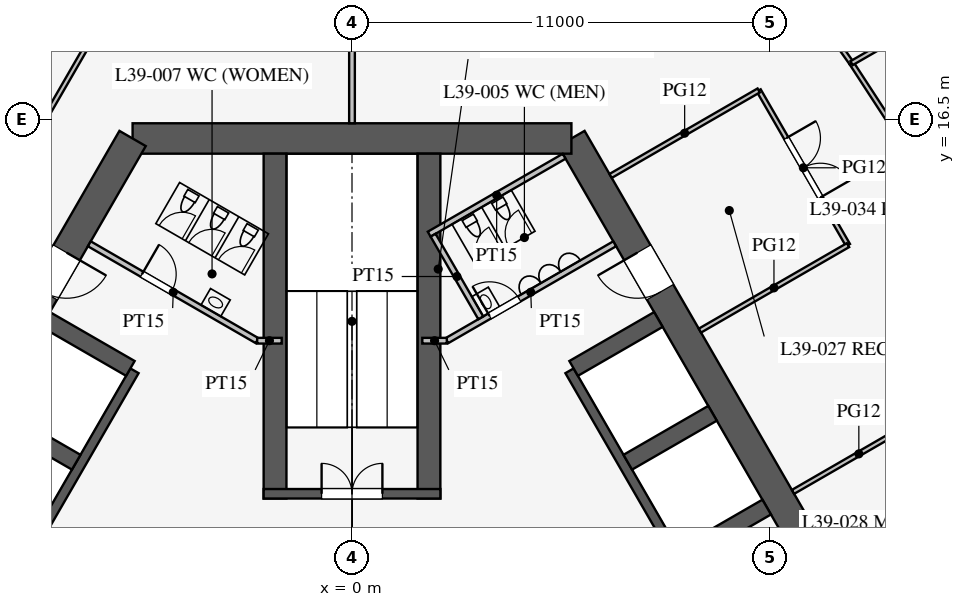
"""IFC4 building model, lengths in metres.
Left out: names, types, materials, properties, quantities, classifications, styles, units other than length and angle.
Written with IfcOpenShell. Run it as: python <this file> out.ifc"""

import sys

from ifc_helpers import new_model, si_unit, direction, frame, frame_2d, origin, place, context, subcontext, project, spatial, rectangle, extrude, element, fill, save


model = new_model("IFC4")
c1 = context("Model", 3, precision=1e-05, world=origin(), true_north=direction((0.0, 1.0)))
c2 = subcontext(c1, "Body", "Model", "MODEL_VIEW")
j1 = project(units=[si_unit("LENGTHUNIT", "METRE"), si_unit("PLANEANGLEUNIT", "RADIAN")], contexts=[c1])
p1 = place(None, origin())
s1 = spatial("IfcSite", under=j1, at=p1, CompositionType="ELEMENT")
p2 = place(p1, origin())
s2 = spatial("IfcBuilding", under=s1, at=p2, CompositionType="ELEMENT")
p3 = place(p2, frame((0.0, 0.0, 170.3)))
s3 = spatial("IfcBuildingStorey", under=s2, at=p3, CompositionType="ELEMENT", Elevation=170.3)
p4 = place(p3, frame((16.743, -3.0, 0.0), z_axis=(0.0, 0.0, 1.0), x_axis=(-0.500002442456, 0.866023993627, 0.0)))
e1 = element("IfcWall", 1, at=p4, inside=s3, PredefinedType="SHEAR", context=c2, shape_type="SweptSolid", body=[
    extrude(rectangle(XDim=21.939, YDim=0.8, at=frame_2d((10.97, 0.0))), origin(), (0.0, 0.0, 1.0), 4.2),
])
p5 = place(p4, frame((17.27, 0.0, 0.0)))
e2 = element("IfcOpeningElement", 2, at=p5, cuts=e1, PredefinedType="OPENING", context=c2, shape_type="SweptSolid", body=[
    extrude(rectangle(XDim=1.2, YDim=2.1, at=frame_2d((0.6, 1.05))), frame((0.0, 0.41, 0.0), z_axis=(0.0, -1.0, 0.0), x_axis=(1.0, 0.0, 0.0)), (0.0, 0.0, 1.0), 0.82),
])
p6 = place(p4, frame((3.47, 0.0, 0.0)))
e3 = element("IfcOpeningElement", 3, at=p6, cuts=e1, PredefinedType="OPENING", context=c2, shape_type="SweptSolid", body=[
    extrude(rectangle(XDim=1.2, YDim=2.1, at=frame_2d((0.6, 1.05))), frame((0.0, 0.41, 0.0), z_axis=(0.0, -1.0, 0.0), x_axis=(1.0, 0.0, 0.0)), (0.0, 0.0, 1.0), 0.82),
])
p7 = place(p3, frame((5.773, 16.0, 0.0), z_axis=(0.0, 0.0, 1.0), x_axis=(-1.0, 0.0, 0.0)))
e4 = element("IfcWall", 4, at=p7, inside=s3, PredefinedType="SHEAR", context=c2, shape_type="SweptSolid", body=[
    extrude(rectangle(XDim=11.547, YDim=0.8, at=frame_2d((5.773, 0.0))), origin(), (0.0, 0.0, 1.0), 4.2),
])
p8 = place(p3, frame((-5.773, 16.0, 0.0), z_axis=(0.0, 0.0, 1.0), x_axis=(-0.500002442456, -0.866023993627, 0.0)))
e5 = element("IfcWall", 5, at=p8, inside=s3, PredefinedType="SHEAR", context=c2, shape_type="SweptSolid", body=[
    extrude(rectangle(XDim=21.939, YDim=0.8, at=frame_2d((10.97, 0.0))), origin(), (0.0, 0.0, 1.0), 4.2),
])
p9 = place(p8, frame((17.27, 0.0, 0.0)))
e6 = element("IfcOpeningElement", 6, at=p9, cuts=e5, PredefinedType="OPENING", context=c2, shape_type="SweptSolid", body=[
    extrude(rectangle(XDim=1.2, YDim=2.1, at=frame_2d((0.6, 1.05))), frame((0.0, 0.41, 0.0), z_axis=(0.0, -1.0, 0.0), x_axis=(1.0, 0.0, 0.0)), (0.0, 0.0, 1.0), 0.82),
])
p10 = place(p8, frame((3.47, 0.0, 0.0)))
e7 = element("IfcOpeningElement", 7, at=p10, cuts=e5, PredefinedType="OPENING", context=c2, shape_type="SweptSolid", body=[
    extrude(rectangle(XDim=1.2, YDim=2.1, at=frame_2d((0.6, 1.05))), frame((0.0, 0.41, 0.0), z_axis=(0.0, -1.0, 0.0), x_axis=(1.0, 0.0, 0.0)), (0.0, 0.0, 1.0), 0.82),
])
p11 = place(p3, frame((11.424, 0.014, 0.0), z_axis=(0.0, 0.0, 1.0), x_axis=(-0.500001763848, 0.866024385424, 0.0)))
e8 = element("IfcWall", 8, at=p11, inside=s3, PredefinedType="SHEAR", context=c2, shape_type="SweptSolid", body=[
    extrude(rectangle(XDim=11.4, YDim=0.25, at=frame_2d((5.7, 0.0))), origin(), (0.0, 0.0, 1.0), 4.2),
])
p12 = place(p11, frame((0.975, 0.0, 0.0)))
e9 = element("IfcOpeningElement", 9, at=p12, cuts=e8, PredefinedType="OPENING", context=c2, shape_type="SweptSolid", body=[
    extrude(rectangle(XDim=0.9, YDim=2.1, at=frame_2d((0.45, 1.05))), frame((0.0, 0.135, 0.0), z_axis=(0.0, -1.0, 0.0), x_axis=(1.0, 0.0, 0.0)), (0.0, 0.0, 1.0), 0.27),
])
p13 = place(p11, frame((3.825, 0.0, 0.0)))
e10 = element("IfcOpeningElement", 10, at=p13, cuts=e8, PredefinedType="OPENING", context=c2, shape_type="SweptSolid", body=[
    extrude(rectangle(XDim=0.9, YDim=2.1, at=frame_2d((0.45, 1.05))), frame((0.0, 0.135, 0.0), z_axis=(0.0, -1.0, 0.0), x_axis=(1.0, 0.0, 0.0)), (0.0, 0.0, 1.0), 0.27),
])
for number, where, z_axis, x_axis in (
    (11, (8.682, 5.012, 0.0), (0.0, 0.0, 1.0), (0.866, 0.5, 0.0)),
    (12, (7.257, 7.481, 0.0), (0.0, 0.0, 1.0), (0.866, 0.5, 0.0)),
):
    element("IfcWall", number, at=place(p3, frame(where, z_axis=z_axis, x_axis=x_axis)), inside=s3, PredefinedType="SHEAR", context=c2, shape_type="SweptSolid", body=[
        extrude(rectangle(XDim=2.575, YDim=0.45, at=frame_2d((1.288, 0.0))), origin(), (0.0, 0.0, 1.0), 4.2),
    ])
p14 = place(p3, frame((5.832, 9.949, 0.0), z_axis=(0.0, 0.0, 1.0), x_axis=(0.866029291668, 0.499993265928, 0.0)))
e13 = element("IfcWall", 13, at=p14, inside=s3, PredefinedType="SHEAR", context=c2, shape_type="SweptSolid", body=[
    extrude(rectangle(XDim=2.575, YDim=0.45, at=frame_2d((1.288, 0.0))), origin(), (0.0, 0.0, 1.0), 4.2),
])
p15 = place(p3, frame((-5.724, 9.886, 0.0), z_axis=(0.0, 0.0, 1.0), x_axis=(-0.500001763848, -0.866024385424, 0.0)))
e14 = element("IfcWall", 14, at=p15, inside=s3, PredefinedType="SHEAR", context=c2, shape_type="SweptSolid", body=[
    extrude(rectangle(XDim=11.4, YDim=0.25, at=frame_2d((5.7, 0.0))), origin(), (0.0, 0.0, 1.0), 4.2),
])
p16 = place(p15, frame((6.525, 0.0, 0.0)))
e15 = element("IfcOpeningElement", 15, at=p16, cuts=e14, PredefinedType="OPENING", context=c2, shape_type="SweptSolid", body=[
    extrude(rectangle(XDim=1.2, YDim=2.2, at=frame_2d((0.6, 1.1))), frame((0.0, 0.135, 0.0), z_axis=(0.0, -1.0, 0.0), x_axis=(1.0, 0.0, 0.0)), (0.0, 0.0, 1.0), 0.27),
])
p17 = place(p15, frame((9.375, 0.0, 0.0)))
e16 = element("IfcOpeningElement", 16, at=p17, cuts=e14, PredefinedType="OPENING", context=c2, shape_type="SweptSolid", body=[
    extrude(rectangle(XDim=1.2, YDim=2.2, at=frame_2d((0.6, 1.1))), frame((0.0, 0.135, 0.0), z_axis=(0.0, -1.0, 0.0), x_axis=(1.0, 0.0, 0.0)), (0.0, 0.0, 1.0), 0.27),
])
p18 = place(p3, frame((-5.832, 9.949, 0.0), z_axis=(0.0, 0.0, 1.0), x_axis=(-0.866029291668, 0.499993265928, 0.0)))
e17 = element("IfcWall", 17, at=p18, inside=s3, PredefinedType="SHEAR", context=c2, shape_type="SweptSolid", body=[
    extrude(rectangle(XDim=2.575, YDim=0.45, at=frame_2d((1.288, 0.0))), origin(), (0.0, 0.0, 1.0), 4.2),
])
p19 = place(p3, frame((-7.257, 7.481, 0.0), z_axis=(0.0, 0.0, 1.0), x_axis=(-0.866046643894, 0.499963209246, 0.0)))
e18 = element("IfcWall", 18, at=p19, inside=s3, PredefinedType="SHEAR", context=c2, shape_type="SweptSolid", body=[
    extrude(rectangle(XDim=2.575, YDim=0.45, at=frame_2d((1.288, 0.0))), origin(), (0.0, 0.0, 1.0), 4.2),
])
for number, where, z_axis, x_axis in (
    (19, (2.025, 6.525, 0.0), (0.0, 0.0, 1.0), (0.0, 1.0, 0.0)),
    (20, (-2.025, 6.525, 0.0), (0.0, 0.0, 1.0), (0.0, 1.0, 0.0)),
):
    element("IfcWall", number, at=place(p3, frame(where, z_axis=z_axis, x_axis=x_axis)), inside=s3, PredefinedType="SHEAR", context=c2, shape_type="SweptSolid", body=[
        extrude(rectangle(XDim=9.075, YDim=0.6, at=frame_2d((4.538, 0.0))), origin(), (0.0, 0.0, 1.0), 4.2),
    ])
p20 = place(p3, frame((2.325, 6.65, 0.0), z_axis=(0.0, 0.0, 1.0), x_axis=(-1.0, 0.0, 0.0)))
e21 = element("IfcWall", 21, at=p20, inside=s3, PredefinedType="SHEAR", context=c2, shape_type="SweptSolid", body=[
    extrude(rectangle(XDim=4.65, YDim=0.25, at=frame_2d((2.325, 0.0))), origin(), (0.0, 0.0, 1.0), 4.2),
])
p21 = place(p20, frame((1.525, 0.0, 0.0)))
e22 = element("IfcOpeningElement", 22, at=p21, cuts=e21, PredefinedType="OPENING", context=c2, shape_type="SweptSolid", body=[
    extrude(rectangle(XDim=1.6, YDim=2.1, at=frame_2d((0.8, 1.05))), frame((0.0, 0.135, 0.0), z_axis=(0.0, -1.0, 0.0), x_axis=(1.0, 0.0, 0.0)), (0.0, 0.0, 1.0), 0.27),
])
p22 = place(p3, frame((2.495, 10.678, 0.0), z_axis=(0.0, 0.0, 1.0), x_axis=(0.86602216432, 0.500005610874, 0.0)))
e23 = element("IfcWall", 23, at=p22, inside=s3, PredefinedType="PARTITIONING", context=c2, shape_type="SweptSolid", body=[
    extrude(rectangle(XDim=5.1, YDim=0.15, at=frame_2d((2.55, 0.0))), origin(), (0.0, 0.0, 1.0), 4.0),
])
p23 = place(p22, frame((1.3, 0.0, 0.0)))
e24 = element("IfcOpeningElement", 24, at=p23, cuts=e23, PredefinedType="OPENING", context=c2, shape_type="SweptSolid", body=[
    extrude(rectangle(XDim=0.9, YDim=2.1, at=frame_2d((0.45, 1.05))), frame((0.0, 0.085, 0.0), z_axis=(0.0, -1.0, 0.0), x_axis=(1.0, 0.0, 0.0)), (0.0, 0.0, 1.0), 0.17),
])
p24 = place(p3, frame((-2.495, 10.678, 0.0), z_axis=(0.0, 0.0, 1.0), x_axis=(-0.86602216432, 0.500005610874, 0.0)))
e25 = element("IfcWall", 25, at=p24, inside=s3, PredefinedType="PARTITIONING", context=c2, shape_type="SweptSolid", body=[
    extrude(rectangle(XDim=5.1, YDim=0.15, at=frame_2d((2.55, 0.0))), origin(), (0.0, 0.0, 1.0), 4.0),
])
p25 = place(p24, frame((2.6, 0.0, 0.0)))
e26 = element("IfcOpeningElement", 26, at=p25, cuts=e25, PredefinedType="OPENING", context=c2, shape_type="SweptSolid", body=[
    extrude(rectangle(XDim=0.9, YDim=2.1, at=frame_2d((0.45, 1.05))), frame((0.0, 0.085, 0.0), z_axis=(0.0, -1.0, 0.0), x_axis=(1.0, 0.0, 0.0)), (0.0, 0.0, 1.0), 0.17),
])
for number, where, z_axis, x_axis in (
    (27, (2.495, 10.678, 0.0), (0.0, 0.0, 1.0), (-1.0, 0.0, 0.0)),
    (28, (-2.495, 10.678, 0.0), (0.0, 0.0, 1.0), (1.0, 0.0, 0.0)),
):
    element("IfcWall", number, at=place(p3, frame(where, z_axis=z_axis, x_axis=x_axis)), inside=s3, PredefinedType="PARTITIONING", context=c2, shape_type="SweptSolid", body=[
        extrude(rectangle(XDim=0.645, YDim=0.15, at=frame_2d((0.323, 0.0))), origin(), (0.0, 0.0, 1.0), 4.0),
    ])
p26 = place(p3, frame((2.031, 13.482, 0.0), z_axis=(0.0, 0.0, 1.0), x_axis=(0.866050731258, 0.499956128963, 0.0)))
e29 = element("IfcWall", 29, at=p26, inside=s3, PredefinedType="PARTITIONING", context=c2, shape_type="SweptSolid", body=[
    extrude(rectangle(XDim=4.1, YDim=0.15, at=frame_2d((2.05, 0.0))), origin(), (0.0, 0.0, 1.0), 4.0),
])
p27 = place(p3, frame((3.389, 11.281, 0.0), z_axis=(0.0, 0.0, 1.0), x_axis=(-0.499989096993, 0.866031698547, 0.0)))
e30 = element("IfcWall", 30, at=p27, inside=s3, PredefinedType="PARTITIONING", context=c2, shape_type="SweptSolid", body=[
    extrude(rectangle(XDim=2.51, YDim=0.15, at=frame_2d((1.255, 0.0))), origin(), (0.0, 0.0, 1.0), 4.0),
])
p28 = place(p3, frame((0.0, 16.4, 0.0), z_axis=(0.0, 0.0, 1.0), x_axis=(0.0, 1.0, 0.0)))
e31 = element("IfcWall", 31, at=p28, inside=s3, PredefinedType="PARTITIONING", context=c2, shape_type="SweptSolid", body=[
    extrude(rectangle(XDim=16.65, YDim=0.15, at=frame_2d((8.325, 0.0))), origin(), (0.0, 0.0, 1.0), 2.3),
])
p29 = place(p3, frame((13.052, 13.194, 0.0), z_axis=(0.0, 0.0, 1.0), x_axis=(-0.499977259774, 0.866038532462, 0.0)))
e32 = element("IfcWall", 32, at=p29, inside=s3, PredefinedType="PARTITIONING", context=c2, shape_type="SweptSolid", body=[
    extrude(rectangle(XDim=4.7, YDim=0.12, at=frame_2d((2.35, 0.0))), origin(), (0.0, 0.0, 1.0), 2.9),
])
p30 = place(p29, frame((1.45, 0.0, 0.15)))
e33 = element("IfcOpeningElement", 33, at=p30, cuts=e32, PredefinedType="OPENING", context=c2, shape_type="SweptSolid", body=[
    extrude(rectangle(XDim=1.8, YDim=2.1, at=frame_2d((0.9, 1.05))), frame((0.0, 0.07, 0.0), z_axis=(0.0, -1.0, 0.0), x_axis=(1.0, 0.0, 0.0)), (0.0, 0.0, 1.0), 0.14),
])
p31 = place(p3, frame((9.155, 10.944, 0.0), z_axis=(0.0, 0.0, 1.0), x_axis=(0.866017533419, 0.500013631625, 0.0)))
e34 = element("IfcWall", 34, at=p31, inside=s3, PredefinedType="PARTITIONING", context=c2, shape_type="SweptSolid", body=[
    extrude(rectangle(XDim=4.5, YDim=0.12, at=frame_2d((2.25, 0.0))), origin(), (0.0, 0.0, 1.0), 2.9),
])
p32 = place(p3, frame((6.805, 15.014, 0.0), z_axis=(0.0, 0.0, 1.0), x_axis=(0.866031096941, 0.499990139034, 0.0)))
e35 = element("IfcWall", 35, at=p32, inside=s3, PredefinedType="PARTITIONING", context=c2, shape_type="SweptSolid", body=[
    extrude(rectangle(XDim=4.5, YDim=0.12, at=frame_2d((2.25, 0.0))), origin(), (0.0, 0.0, 1.0), 2.9),
])
p33 = place(p3, frame((11.605, 6.7, 0.0), z_axis=(0.0, 0.0, 1.0), x_axis=(0.866026010844, 0.49999894854, 0.0)))
e36 = element("IfcWall", 36, at=p33, inside=s3, PredefinedType="PARTITIONING", context=c2, shape_type="SweptSolid", body=[
    extrude(rectangle(XDim=4.0, YDim=0.12, at=frame_2d((2.0, 0.0))), origin(), (0.0, 0.0, 1.0), 2.6),
])
p34 = place(p3, frame((15.606, 14.206, 0.0), z_axis=(0.0, 0.0, 1.0), x_axis=(-0.546069464151, 0.837739900161, 0.0)))
e37 = element("IfcWall", 37, at=p34, inside=s3, PredefinedType="PARTITIONING", context=c2, shape_type="SweptSolid", body=[
    extrude(rectangle(XDim=4.507, YDim=0.12, at=frame_2d((2.253, 0.0))), origin(), (0.0, 0.0, 1.0), 2.9),
])
p35 = place(p34, frame((1.8, 0.0, 0.15)))
e38 = element("IfcOpeningElement", 38, at=p35, cuts=e37, PredefinedType="OPENING", context=c2, shape_type="SweptSolid", body=[
    extrude(rectangle(XDim=0.9, YDim=2.1, at=frame_2d((0.45, 1.05))), frame((0.0, 0.07, 0.0), z_axis=(0.0, -1.0, 0.0), x_axis=(1.0, 0.0, 0.0)), (0.0, 0.0, 1.0), 0.14),
])
p36 = place(p3, frame((13.145, 17.982, 0.0), z_axis=(0.0, 0.0, 1.0), x_axis=(-0.575987178736, 0.817458726745, 0.0)))
e39 = element("IfcWall", 39, at=p36, inside=s3, PredefinedType="PARTITIONING", context=c2, shape_type="SweptSolid", body=[
    extrude(rectangle(XDim=4.518, YDim=0.12, at=frame_2d((2.259, 0.0))), origin(), (0.0, 0.0, 1.0), 2.9),
])
p37 = place(p3, frame((13.145, 17.982, 0.0), z_axis=(0.0, 0.0, 1.0), x_axis=(0.866018637367, 0.500011719595, 0.0)))
e40 = element("IfcWall", 40, at=p37, inside=s3, PredefinedType="PARTITIONING", context=c2, shape_type="SweptSolid", body=[
    extrude(rectangle(XDim=4.116, YDim=0.12, at=frame_2d((2.058, 0.0))), origin(), (0.0, 0.0, 1.0), 2.6),
])
p38 = place(p3, frame((-0.016, 30.491, 0.0), z_axis=(0.0, 0.0, 1.0), x_axis=(-0.50000091641, -0.866024874695, 0.0)))
e41 = element("IfcWall", 41, at=p38, inside=s3, PredefinedType="PARTITIONING", context=c2, shape_type="SweptSolid", body=[
    extrude(rectangle(XDim=52.796, YDim=0.12, at=frame_2d((26.398, 0.0))), origin(), (0.0, 0.0, 1.0), 2.9),
])
p39 = place(p38, frame((10.2, 0.0, 0.15)))
e42 = element("IfcOpeningElement", 42, at=p39, cuts=e41, PredefinedType="OPENING", context=c2, shape_type="SweptSolid", body=[
    extrude(rectangle(XDim=1.8, YDim=2.1, at=frame_2d((0.9, 1.05))), frame((0.0, 0.07, 0.0), z_axis=(0.0, -1.0, 0.0), x_axis=(1.0, 0.0, 0.0)), (0.0, 0.0, 1.0), 0.14),
])
p40 = place(p38, frame((40.8, 0.0, 0.15)))
e43 = element("IfcOpeningElement", 43, at=p40, cuts=e41, PredefinedType="OPENING", context=c2, shape_type="SweptSolid", body=[
    extrude(rectangle(XDim=1.8, YDim=2.1, at=frame_2d((0.9, 1.05))), frame((0.0, 0.07, 0.0), z_axis=(0.0, -1.0, 0.0), x_axis=(1.0, 0.0, 0.0)), (0.0, 0.0, 1.0), 0.14),
])
p41 = place(p23, origin())
e44 = element("IfcDoor", 44, at=p41, inside=s3, OperationType="SINGLE_SWING_LEFT", PredefinedType="DOOR", context=c2, shape_type="SweptSolid", body=[
    extrude(rectangle(XDim=0.9, YDim=2.1, at=frame_2d((0.45, 1.05))), frame((0.0, 0.025, 0.0), z_axis=(0.0, -1.0, 0.0), x_axis=(1.0, 0.0, 0.0)), (0.0, 0.0, 1.0), 0.05),
])
fill(e24, e44)
p42 = place(p25, frame((0.9, 0.0, 0.0), z_axis=(0.0, 0.0, 1.0), x_axis=(-1.0, 0.0, 0.0)))
e45 = element("IfcDoor", 45, at=p42, inside=s3, OperationType="SINGLE_SWING_LEFT", PredefinedType="DOOR", context=c2, shape_type="SweptSolid", body=[
    extrude(rectangle(XDim=0.9, YDim=2.1, at=frame_2d((0.45, 1.05))), frame((0.0, 0.025, 0.0), z_axis=(0.0, -1.0, 0.0), x_axis=(1.0, 0.0, 0.0)), (0.0, 0.0, 1.0), 0.05),
])
fill(e26, e45)
p43 = place(p21, frame((1.6, 0.0, 0.0), z_axis=(0.0, 0.0, 1.0), x_axis=(-1.0, 0.0, 0.0)))
e46 = element("IfcDoor", 46, at=p43, inside=s3, OperationType="DOUBLE_DOOR_SINGLE_SWING", PredefinedType="DOOR", context=c2, shape_type="SweptSolid", body=[
    extrude(rectangle(XDim=1.6, YDim=2.1, at=frame_2d((0.8, 1.05))), frame((0.0, 0.025, 0.0), z_axis=(0.0, -1.0, 0.0), x_axis=(1.0, 0.0, 0.0)), (0.0, 0.0, 1.0), 0.05),
])
fill(e22, e46)
p44 = place(p5, origin())
e47 = element("IfcDoor", 47, at=p44, inside=s3, OperationType="SINGLE_SWING_RIGHT", PredefinedType="DOOR", context=c2, shape_type="SweptSolid", body=[
    extrude(rectangle(XDim=1.2, YDim=2.1, at=frame_2d((0.6, 1.05))), frame((0.0, 0.025, 0.0), z_axis=(0.0, -1.0, 0.0), x_axis=(1.0, 0.0, 0.0)), (0.0, 0.0, 1.0), 0.05),
])
fill(e2, e47)
p45 = place(p10, origin())
e48 = element("IfcDoor", 48, at=p45, inside=s3, OperationType="SINGLE_SWING_LEFT", PredefinedType="DOOR", context=c2, shape_type="SweptSolid", body=[
    extrude(rectangle(XDim=1.2, YDim=2.1, at=frame_2d((0.6, 1.05))), frame((0.0, 0.025, 0.0), z_axis=(0.0, -1.0, 0.0), x_axis=(1.0, 0.0, 0.0)), (0.0, 0.0, 1.0), 0.05),
])
fill(e7, e48)
p46 = place(p30, frame((1.8, 0.0, 0.0), z_axis=(0.0, 0.0, 1.0), x_axis=(-1.0, 0.0, 0.0)))
e49 = element("IfcDoor", 49, at=p46, inside=s3, OperationType="DOUBLE_DOOR_SINGLE_SWING", PredefinedType="DOOR", context=c2, shape_type="SweptSolid", body=[
    extrude(rectangle(XDim=1.8, YDim=2.1, at=frame_2d((0.9, 1.05))), frame((0.0, 0.025, 0.0), z_axis=(0.0, -1.0, 0.0), x_axis=(1.0, 0.0, 0.0)), (0.0, 0.0, 1.0), 0.05),
])
fill(e33, e49)
save(model, sys.argv[1])
